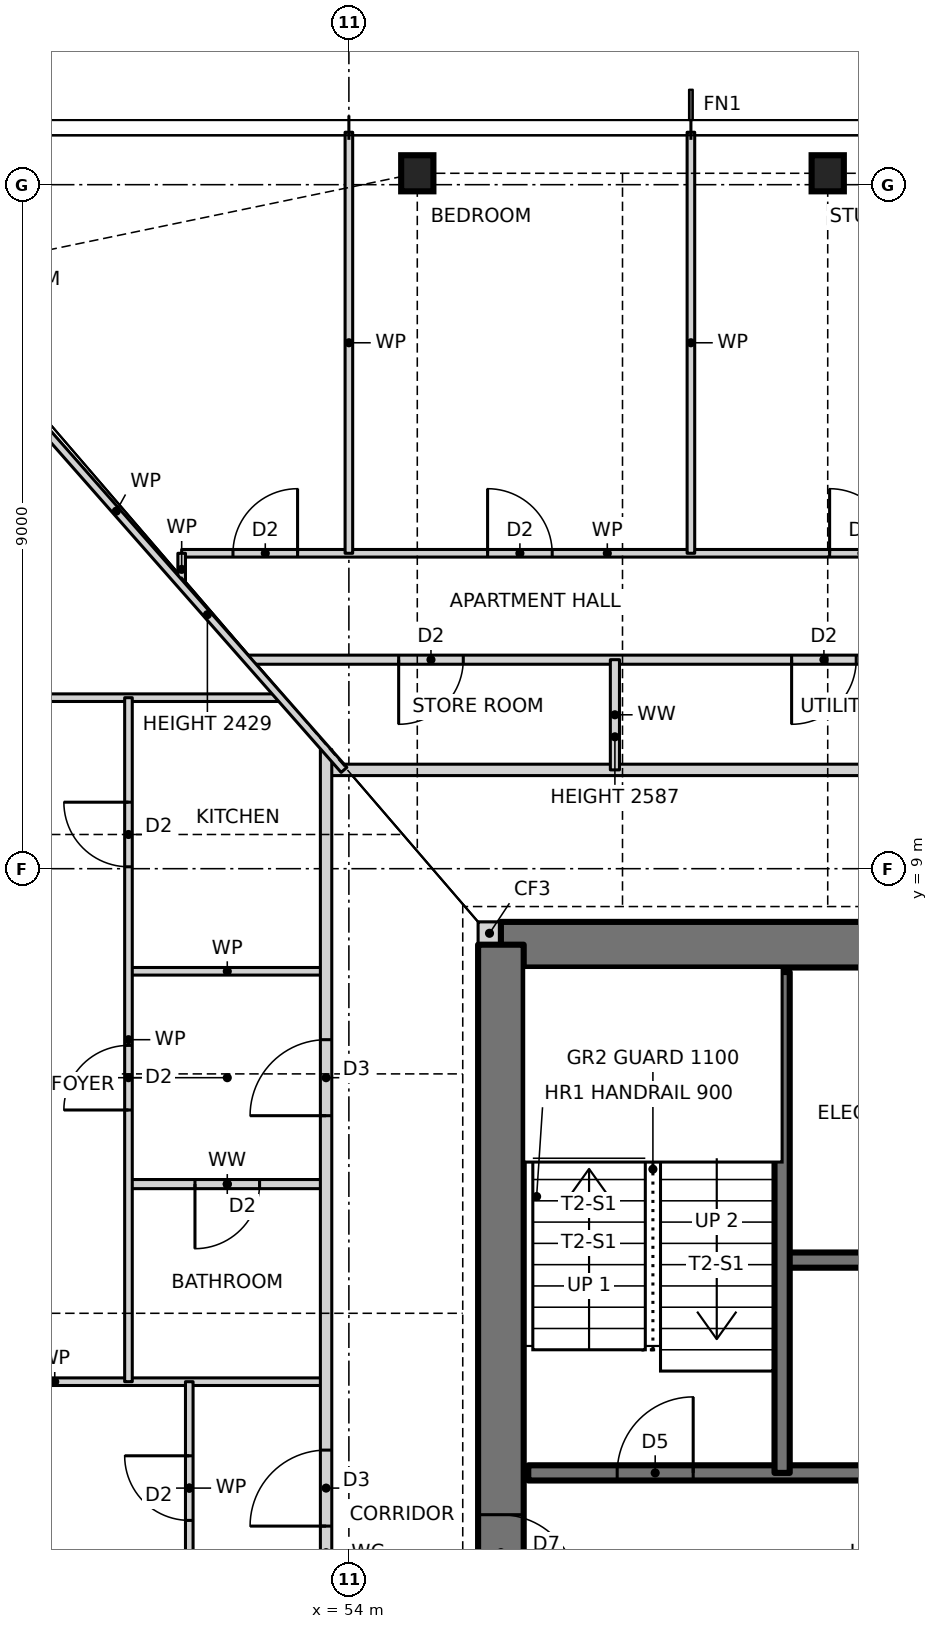
"""IFC4 building model, lengths in metres.
Left out: names, types, materials, properties, quantities, classifications, styles, units other than length and angle.
Written with IfcOpenShell. Run it as: python <this file> out.ifc"""

import sys

from ifc_helpers import new_model, si_unit, direction, frame, frame_2d, origin, origin_2d, place, context, subcontext, project, spatial, rectangle, i_section, extrude, element, fill, save


model = new_model("IFC4")
c1 = context("Model", 3, precision=1e-05, world=origin(), true_north=direction((0.0, 1.0)))
c2 = subcontext(c1, "Body", "Model", "MODEL_VIEW")
j1 = project(units=[si_unit("LENGTHUNIT", "METRE"), si_unit("PLANEANGLEUNIT", "RADIAN")], contexts=[c1])
p1 = place(None, origin())
s1 = spatial("IfcSite", under=j1, at=p1, CompositionType="ELEMENT")
p2 = place(p1, origin())
s2 = spatial("IfcBuilding", under=s1, at=p2, CompositionType="ELEMENT")
p3 = place(p2, frame((0.0, 0.0, 50.0)))
s3 = spatial("IfcBuildingStorey", under=s2, at=p3, CompositionType="ELEMENT", Elevation=50.0)
for number, where, z_axis, x_axis in (
    (1, (60.3, 18.15, 0.0), (0.0, 0.0, 1.0), (1.0, 0.0, 0.0)),
    (2, (54.9, 18.15, 0.0), (0.0, 0.0, 1.0), (1.0, 0.0, 0.0)),
):
    element("IfcColumn", number, at=place(p3, frame(where, z_axis=z_axis, x_axis=x_axis)), inside=s3, PredefinedType="COLUMN", context=c2, shape_type="SweptSolid", body=[
        extrude(i_section(OverallWidth=0.424, OverallDepth=0.475, WebThickness=0.048, FlangeThickness=0.077, at=origin_2d()), origin(), (0.0, 0.0, 1.0), 3.5),
    ])
p4 = place(p3, frame((55.7, 8.15, 0.0), z_axis=(0.0, 0.0, 1.0), x_axis=(1.0, 0.0, 0.0)))
e3 = element("IfcWall", 3, at=p4, inside=s3, PredefinedType="SOLIDWALL", context=c2, shape_type="SweptSolid", body=[
    extrude(rectangle(XDim=0.3, YDim=0.3, at=frame_2d((0.15, 0.0))), origin(), (0.0, 0.0, 1.0), 3.5),
])
p5 = place(p3, frame((70.0, 8.0, 0.0), z_axis=(0.0, 0.0, 1.0), x_axis=(-1.0, 0.0, 0.0)))
e4 = element("IfcWall", 4, at=p5, inside=s3, PredefinedType="SHEAR", context=c2, shape_type="SweptSolid", body=[
    extrude(rectangle(XDim=14.0, YDim=0.6, at=frame_2d((7.0, 0.0))), origin(), (0.0, 0.0, 1.0), 3.5),
])
p6 = place(p5, frame((8.2, 0.0, 0.0)))
e5 = element("IfcOpeningElement", 5, at=p6, cuts=e4, PredefinedType="OPENING", context=c2, shape_type="SweptSolid", body=[
    extrude(rectangle(XDim=0.9, YDim=2.1, at=frame_2d((0.45, 1.05))), frame((0.0, 0.31, 0.0), z_axis=(0.0, -1.0, 0.0), x_axis=(1.0, 0.0, 0.0)), (0.0, 0.0, 1.0), 0.62),
])
p7 = place(p5, frame((3.2, 0.0, 0.0)))
e6 = element("IfcOpeningElement", 6, at=p7, cuts=e4, PredefinedType="OPENING", context=c2, shape_type="SweptSolid", body=[
    extrude(rectangle(XDim=0.9, YDim=2.1, at=frame_2d((0.45, 1.05))), frame((0.0, 0.31, 0.0), z_axis=(0.0, -1.0, 0.0), x_axis=(1.0, 0.0, 0.0)), (0.0, 0.0, 1.0), 0.62),
])
p8 = place(p3, frame((56.0, 8.0, 0.0), z_axis=(0.0, 0.0, 1.0), x_axis=(0.0, -1.0, 0.0)))
e7 = element("IfcWall", 7, at=p8, inside=s3, PredefinedType="SHEAR", context=c2, shape_type="SweptSolid", body=[
    extrude(rectangle(XDim=16.0, YDim=0.6, at=frame_2d((8.0, 0.0))), origin(), (0.0, 0.0, 1.0), 3.5),
])
p9 = place(p8, frame((7.5, 0.0, 0.0)))
e8 = element("IfcOpeningElement", 8, at=p9, cuts=e7, PredefinedType="OPENING", context=c2, shape_type="SweptSolid", body=[
    extrude(rectangle(XDim=1.0, YDim=2.1, at=frame_2d((0.5, 1.05))), frame((0.0, 0.31, 0.0), z_axis=(0.0, -1.0, 0.0), x_axis=(1.0, 0.0, 0.0)), (0.0, 0.0, 1.0), 0.62),
])
p10 = place(p3, frame((56.36, 1.05, 0.0), z_axis=(0.0, 0.0, 1.0), x_axis=(1.0, 0.0, 0.0)))
e9 = element("IfcWall", 9, at=p10, inside=s3, PredefinedType="SOLIDWALL", context=c2, shape_type="SweptSolid", body=[
    extrude(rectangle(XDim=13.28, YDim=0.2, at=frame_2d((6.64, 0.0))), origin(), (0.0, 0.0, 1.0), 3.5),
])
p11 = place(p10, frame((1.17, 0.0, 0.0)))
e10 = element("IfcOpeningElement", 10, at=p11, cuts=e9, PredefinedType="OPENING", context=c2, shape_type="SweptSolid", body=[
    extrude(rectangle(XDim=1.0, YDim=2.1, at=frame_2d((0.5, 1.05))), frame((0.0, 0.11, 0.0), z_axis=(0.0, -1.0, 0.0), x_axis=(1.0, 0.0, 0.0)), (0.0, 0.0, 1.0), 0.22),
])
p12 = place(p10, frame((6.19, 0.0, 0.0)))
e11 = element("IfcOpeningElement", 11, at=p12, cuts=e9, PredefinedType="OPENING", context=c2, shape_type="SweptSolid", body=[
    extrude(rectangle(XDim=0.9, YDim=2.1, at=frame_2d((0.45, 1.05))), frame((0.0, 0.11, 0.0), z_axis=(0.0, -1.0, 0.0), x_axis=(1.0, 0.0, 0.0)), (0.0, 0.0, 1.0), 0.22),
])
p13 = place(p10, frame((10.96, 0.0, 0.0)))
e12 = element("IfcOpeningElement", 12, at=p13, cuts=e9, PredefinedType="OPENING", context=c2, shape_type="SweptSolid", body=[
    extrude(rectangle(XDim=1.3, YDim=2.1, at=frame_2d((0.65, 1.05))), frame((0.0, 0.11, 0.0), z_axis=(0.0, -1.0, 0.0), x_axis=(1.0, 0.0, 0.0)), (0.0, 0.0, 1.0), 0.22),
])
p14 = place(p3, frame((46.56, 2.25, 0.0), z_axis=(0.0, 0.0, 1.0), x_axis=(1.0, 0.0, 0.0)))
e13 = element("IfcWall", 13, at=p14, inside=s3, PredefinedType="PARTITIONING", context=c2, shape_type="SweptSolid", body=[
    extrude(rectangle(XDim=7.14, YDim=0.1, at=frame_2d((3.57, 0.0))), origin(), (0.0, 0.0, 1.0), 3.27),
])
p15 = place(p3, frame((59.7, 3.85, 0.0), z_axis=(0.0, 0.0, 1.0), x_axis=(1.0, 0.0, 0.0)))
e14 = element("IfcWall", 14, at=p15, inside=s3, PredefinedType="SOLIDWALL", context=c2, shape_type="SweptSolid", body=[
    extrude(rectangle(XDim=9.94, YDim=0.2, at=frame_2d((4.97, 0.0))), origin(), (0.0, 0.0, 1.0), 3.5),
])
p16 = place(p3, frame((51.1, 4.85, 0.0), z_axis=(0.0, 0.0, 1.0), x_axis=(1.0, 0.0, 0.0)))
e15 = element("IfcWall", 15, at=p16, inside=s3, PredefinedType="PARTITIONING", context=c2, shape_type="SweptSolid", body=[
    extrude(rectangle(XDim=2.6, YDim=0.12, at=frame_2d((1.3, 0.0))), origin(), (0.0, 0.0, 1.0), 3.27),
])
p17 = place(p16, frame((0.875, 0.0, 0.0)))
e16 = element("IfcOpeningElement", 16, at=p17, cuts=e15, PredefinedType="OPENING", context=c2, shape_type="SweptSolid", body=[
    extrude(rectangle(XDim=0.85, YDim=2.1, at=frame_2d((0.425, 1.05))), frame((0.0, 0.07, 0.0), z_axis=(0.0, -1.0, 0.0), x_axis=(1.0, 0.0, 0.0)), (0.0, 0.0, 1.0), 0.14),
])
p18 = place(p3, frame((51.1, 7.65, 0.0), z_axis=(0.0, 0.0, 1.0), x_axis=(1.0, 0.0, 0.0)))
e17 = element("IfcWall", 17, at=p18, inside=s3, PredefinedType="PARTITIONING", context=c2, shape_type="SweptSolid", body=[
    extrude(rectangle(XDim=2.6, YDim=0.1, at=frame_2d((1.3, 0.0))), origin(), (0.0, 0.0, 1.0), 3.27),
])
p19 = place(p3, frame((53.7, 10.3, 0.0), z_axis=(0.0, 0.0, 1.0), x_axis=(1.0, 0.0, 0.0)))
e18 = element("IfcWall", 18, at=p19, inside=s3, PredefinedType="PARTITIONING", context=c2, shape_type="SweptSolid", body=[
    extrude(rectangle(XDim=18.6, YDim=0.15, at=frame_2d((9.3, 0.0))), origin(), (0.0, 0.0, 1.0), 3.27),
])
p20 = place(p19, frame((12.8, 0.0, 0.0)))
e19 = element("IfcOpeningElement", 19, at=p20, cuts=e18, PredefinedType="OPENING", context=c2, shape_type="SweptSolid", body=[
    extrude(rectangle(XDim=1.0, YDim=2.1, at=frame_2d((0.5, 1.05))), frame((0.0, 0.085, 0.0), z_axis=(0.0, -1.0, 0.0), x_axis=(1.0, 0.0, 0.0)), (0.0, 0.0, 1.0), 0.17),
])
p21 = place(p3, frame((46.56, 11.25, 0.0), z_axis=(0.0, 0.0, 1.0), x_axis=(1.0, 0.0, 0.0)))
e20 = element("IfcWall", 20, at=p21, inside=s3, PredefinedType="PARTITIONING", context=c2, shape_type="SweptSolid", body=[
    extrude(rectangle(XDim=6.54, YDim=0.1, at=frame_2d((3.27, 0.0))), origin(), (0.0, 0.0, 1.0), 3.27),
])
p22 = place(p21, frame((1.845, 0.0, 0.0)))
e21 = element("IfcOpeningElement", 21, at=p22, cuts=e20, PredefinedType="OPENING", context=c2, shape_type="SweptSolid", body=[
    extrude(rectangle(XDim=0.85, YDim=2.1, at=frame_2d((0.425, 1.05))), frame((0.0, 0.06, 0.0), z_axis=(0.0, -1.0, 0.0), x_axis=(1.0, 0.0, 0.0)), (0.0, 0.0, 1.0), 0.12),
])
p23 = place(p3, frame((52.66, 11.75, 0.0), z_axis=(0.0, 0.0, 1.0), x_axis=(1.0, 0.0, 0.0)))
e22 = element("IfcWall", 22, at=p23, inside=s3, PredefinedType="PARTITIONING", context=c2, shape_type="SweptSolid", body=[
    extrude(rectangle(XDim=19.34, YDim=0.12, at=frame_2d((9.67, 0.0))), origin(), (0.0, 0.0, 1.0), 3.27),
])
p24 = place(p23, frame((17.115, 0.0, 0.0)))
e23 = element("IfcOpeningElement", 23, at=p24, cuts=e22, PredefinedType="OPENING", context=c2, shape_type="SweptSolid", body=[
    extrude(rectangle(XDim=0.85, YDim=2.1, at=frame_2d((0.425, 1.05))), frame((0.0, 0.07, 0.0), z_axis=(0.0, -1.0, 0.0), x_axis=(1.0, 0.0, 0.0)), (0.0, 0.0, 1.0), 0.14),
])
p25 = place(p23, frame((13.915, 0.0, 0.0)))
e24 = element("IfcOpeningElement", 24, at=p25, cuts=e22, PredefinedType="OPENING", context=c2, shape_type="SweptSolid", body=[
    extrude(rectangle(XDim=0.85, YDim=2.1, at=frame_2d((0.425, 1.05))), frame((0.0, 0.07, 0.0), z_axis=(0.0, -1.0, 0.0), x_axis=(1.0, 0.0, 0.0)), (0.0, 0.0, 1.0), 0.14),
])
p26 = place(p23, frame((7.165, 0.0, 0.0)))
e25 = element("IfcOpeningElement", 25, at=p26, cuts=e22, PredefinedType="OPENING", context=c2, shape_type="SweptSolid", body=[
    extrude(rectangle(XDim=0.85, YDim=2.1, at=frame_2d((0.425, 1.05))), frame((0.0, 0.07, 0.0), z_axis=(0.0, -1.0, 0.0), x_axis=(1.0, 0.0, 0.0)), (0.0, 0.0, 1.0), 0.14),
])
p27 = place(p23, frame((1.995, 0.0, 0.0)))
e26 = element("IfcOpeningElement", 26, at=p27, cuts=e22, PredefinedType="OPENING", context=c2, shape_type="SweptSolid", body=[
    extrude(rectangle(XDim=0.85, YDim=2.1, at=frame_2d((0.425, 1.05))), frame((0.0, 0.07, 0.0), z_axis=(0.0, -1.0, 0.0), x_axis=(1.0, 0.0, 0.0)), (0.0, 0.0, 1.0), 0.14),
])
p28 = place(p3, frame((51.8, 13.15, 0.0), z_axis=(0.0, 0.0, 1.0), x_axis=(1.0, 0.0, 0.0)))
e27 = element("IfcWall", 27, at=p28, inside=s3, PredefinedType="PARTITIONING", context=c2, shape_type="SweptSolid", body=[
    extrude(rectangle(XDim=11.2, YDim=0.1, at=frame_2d((5.6, 0.0))), origin(), (0.0, 0.0, 1.0), 3.27),
])
p29 = place(p28, frame((8.525, 0.0, 0.0)))
e28 = element("IfcOpeningElement", 28, at=p29, cuts=e27, PredefinedType="OPENING", context=c2, shape_type="SweptSolid", body=[
    extrude(rectangle(XDim=0.85, YDim=2.1, at=frame_2d((0.425, 1.05))), frame((0.0, 0.06, 0.0), z_axis=(0.0, -1.0, 0.0), x_axis=(1.0, 0.0, 0.0)), (0.0, 0.0, 1.0), 0.12),
])
p30 = place(p28, frame((4.025, 0.0, 0.0)))
e29 = element("IfcOpeningElement", 29, at=p30, cuts=e27, PredefinedType="OPENING", context=c2, shape_type="SweptSolid", body=[
    extrude(rectangle(XDim=0.85, YDim=2.1, at=frame_2d((0.425, 1.05))), frame((0.0, 0.06, 0.0), z_axis=(0.0, -1.0, 0.0), x_axis=(1.0, 0.0, 0.0)), (0.0, 0.0, 1.0), 0.12),
])
p31 = place(p28, frame((0.675, 0.0, 0.0)))
e30 = element("IfcOpeningElement", 30, at=p31, cuts=e27, PredefinedType="OPENING", context=c2, shape_type="SweptSolid", body=[
    extrude(rectangle(XDim=0.85, YDim=2.1, at=frame_2d((0.425, 1.05))), frame((0.0, 0.06, 0.0), z_axis=(0.0, -1.0, 0.0), x_axis=(1.0, 0.0, 0.0)), (0.0, 0.0, 1.0), 0.12),
])
p32 = place(p3, frame((59.7, 1.05, 0.0), z_axis=(0.0, 0.0, 1.0), x_axis=(0.0, 1.0, 0.0)))
e31 = element("IfcWall", 31, at=p32, inside=s3, PredefinedType="SOLIDWALL", context=c2, shape_type="SweptSolid", body=[
    extrude(rectangle(XDim=6.59, YDim=0.2, at=frame_2d((3.295, 0.0))), origin(), (0.0, 0.0, 1.0), 3.5),
])
p33 = place(p3, frame((58.5, 13.15, 0.0), z_axis=(0.0, 0.0, 1.0), x_axis=(0.0, 1.0, 0.0)))
e32 = element("IfcWall", 32, at=p33, inside=s3, PredefinedType="PARTITIONING", context=c2, shape_type="SweptSolid", body=[
    extrude(rectangle(XDim=5.54, YDim=0.1, at=frame_2d((2.77, 0.0))), origin(), (0.0, 0.0, 1.0), 3.27),
])
p34 = place(p3, frame((57.5, 10.3, 0.0), z_axis=(0.0, 0.0, 1.0), x_axis=(0.0, 1.0, 0.0)))
e33 = element("IfcWall", 33, at=p34, inside=s3, PredefinedType="PARTITIONING", context=c2, shape_type="SweptSolid", body=[
    extrude(rectangle(XDim=1.45, YDim=0.12, at=frame_2d((0.725, 0.0))), origin(), (0.0, 0.0, 1.0), 2.587),
])
p35 = place(p3, frame((54.0, 13.15, 0.0), z_axis=(0.0, 0.0, 1.0), x_axis=(0.0, 1.0, 0.0)))
e34 = element("IfcWall", 34, at=p35, inside=s3, PredefinedType="PARTITIONING", context=c2, shape_type="SweptSolid", body=[
    extrude(rectangle(XDim=5.54, YDim=0.1, at=frame_2d((2.77, 0.0))), origin(), (0.0, 0.0, 1.0), 3.27),
])
p36 = place(p3, frame((53.7, -10.568, 0.0), z_axis=(0.0, 0.0, 1.0), x_axis=(0.0, 1.0, 0.0)))
e35 = element("IfcWall", 35, at=p36, inside=s3, PredefinedType="PARTITIONING", context=c2, shape_type="SweptSolid", body=[
    extrude(rectangle(XDim=21.136, YDim=0.15, at=frame_2d((10.568, 0.0))), origin(), (0.0, 0.0, 1.0), 3.27),
])
p37 = place(p36, frame((16.318, 0.0, 0.0)))
e36 = element("IfcOpeningElement", 36, at=p37, cuts=e35, PredefinedType="OPENING", context=c2, shape_type="SweptSolid", body=[
    extrude(rectangle(XDim=1.0, YDim=2.1, at=frame_2d((0.5, 1.05))), frame((0.0, 0.085, 0.0), z_axis=(0.0, -1.0, 0.0), x_axis=(1.0, 0.0, 0.0)), (0.0, 0.0, 1.0), 0.17),
])
p38 = place(p36, frame((10.918, 0.0, 0.0)))
e37 = element("IfcOpeningElement", 37, at=p38, cuts=e35, PredefinedType="OPENING", context=c2, shape_type="SweptSolid", body=[
    extrude(rectangle(XDim=1.0, YDim=2.1, at=frame_2d((0.5, 1.05))), frame((0.0, 0.085, 0.0), z_axis=(0.0, -1.0, 0.0), x_axis=(1.0, 0.0, 0.0)), (0.0, 0.0, 1.0), 0.17),
])
p39 = place(p3, frame((51.9, -0.55, 0.0), z_axis=(0.0, 0.0, 1.0), x_axis=(0.0, 1.0, 0.0)))
e38 = element("IfcWall", 38, at=p39, inside=s3, PredefinedType="PARTITIONING", context=c2, shape_type="SweptSolid", body=[
    extrude(rectangle(XDim=2.8, YDim=0.1, at=frame_2d((1.4, 0.0))), origin(), (0.0, 0.0, 1.0), 3.27),
])
p40 = place(p39, frame((0.975, 0.0, 0.0)))
e39 = element("IfcOpeningElement", 39, at=p40, cuts=e38, PredefinedType="OPENING", context=c2, shape_type="SweptSolid", body=[
    extrude(rectangle(XDim=0.85, YDim=2.1, at=frame_2d((0.425, 1.05))), frame((0.0, 0.06, 0.0), z_axis=(0.0, -1.0, 0.0), x_axis=(1.0, 0.0, 0.0)), (0.0, 0.0, 1.0), 0.12),
])
p41 = place(p3, frame((51.8, 12.727, 0.0), z_axis=(0.0, 0.0, 1.0), x_axis=(0.0, 1.0, 0.0)))
e40 = element("IfcWall", 40, at=p41, inside=s3, PredefinedType="PARTITIONING", context=c2, shape_type="SweptSolid", body=[
    extrude(rectangle(XDim=0.423, YDim=0.1, at=frame_2d((0.211, 0.0))), origin(), (0.0, 0.0, 1.0), 3.27),
])
p42 = place(p3, frame((51.1, 2.25, 0.0), z_axis=(0.0, 0.0, 1.0), x_axis=(0.0, 1.0, 0.0)))
e41 = element("IfcWall", 41, at=p42, inside=s3, PredefinedType="PARTITIONING", context=c2, shape_type="SweptSolid", body=[
    extrude(rectangle(XDim=9.0, YDim=0.1, at=frame_2d((4.5, 0.0))), origin(), (0.0, 0.0, 1.0), 3.27),
])
p43 = place(p42, frame((6.775, 0.0, 0.0)))
e42 = element("IfcOpeningElement", 42, at=p43, cuts=e41, PredefinedType="OPENING", context=c2, shape_type="SweptSolid", body=[
    extrude(rectangle(XDim=0.85, YDim=2.1, at=frame_2d((0.425, 1.05))), frame((0.0, 0.06, 0.0), z_axis=(0.0, -1.0, 0.0), x_axis=(1.0, 0.0, 0.0)), (0.0, 0.0, 1.0), 0.12),
])
p44 = place(p42, frame((3.575, 0.0, 0.0)))
e43 = element("IfcOpeningElement", 43, at=p44, cuts=e41, PredefinedType="OPENING", context=c2, shape_type="SweptSolid", body=[
    extrude(rectangle(XDim=0.85, YDim=2.1, at=frame_2d((0.425, 1.05))), frame((0.0, 0.06, 0.0), z_axis=(0.0, -1.0, 0.0), x_axis=(1.0, 0.0, 0.0)), (0.0, 0.0, 1.0), 0.12),
])
p45 = place(p3, frame((53.936, 10.3, 0.0), z_axis=(0.0, 0.0, 1.0), x_axis=(-0.660638210404, 0.750704439146, 0.0)))
e44 = element("IfcWall", 44, at=p45, inside=s3, PredefinedType="PARTITIONING", context=c2, shape_type="SweptSolid", body=[
    extrude(rectangle(XDim=9.07, YDim=0.1, at=frame_2d((4.535, 0.0))), origin(), (0.0, 0.0, 1.0), 2.429),
])
p46 = place(p11, origin())
e45 = element("IfcDoor", 45, at=p46, inside=s3, OperationType="SINGLE_SWING_RIGHT", PredefinedType="DOOR", context=c2, shape_type="SweptSolid", body=[
    extrude(rectangle(XDim=1.0, YDim=2.1, at=frame_2d((0.5, 1.05))), frame((0.0, 0.025, 0.0), z_axis=(0.0, -1.0, 0.0), x_axis=(1.0, 0.0, 0.0)), (0.0, 0.0, 1.0), 0.05),
])
fill(e10, e45)
p47 = place(p29, origin())
e46 = element("IfcDoor", 46, at=p47, inside=s3, OperationType="SINGLE_SWING_LEFT", PredefinedType="DOOR", context=c2, shape_type="SweptSolid", body=[
    extrude(rectangle(XDim=0.85, YDim=2.1, at=frame_2d((0.425, 1.05))), frame((0.0, 0.025, 0.0), z_axis=(0.0, -1.0, 0.0), x_axis=(1.0, 0.0, 0.0)), (0.0, 0.0, 1.0), 0.05),
])
fill(e28, e46)
p48 = place(p30, origin())
e47 = element("IfcDoor", 47, at=p48, inside=s3, OperationType="SINGLE_SWING_LEFT", PredefinedType="DOOR", context=c2, shape_type="SweptSolid", body=[
    extrude(rectangle(XDim=0.85, YDim=2.1, at=frame_2d((0.425, 1.05))), frame((0.0, 0.025, 0.0), z_axis=(0.0, -1.0, 0.0), x_axis=(1.0, 0.0, 0.0)), (0.0, 0.0, 1.0), 0.05),
])
fill(e29, e47)
p49 = place(p31, origin())
e48 = element("IfcDoor", 48, at=p49, inside=s3, OperationType="SINGLE_SWING_RIGHT", PredefinedType="DOOR", context=c2, shape_type="SweptSolid", body=[
    extrude(rectangle(XDim=0.85, YDim=2.1, at=frame_2d((0.425, 1.05))), frame((0.0, 0.025, 0.0), z_axis=(0.0, -1.0, 0.0), x_axis=(1.0, 0.0, 0.0)), (0.0, 0.0, 1.0), 0.05),
])
fill(e30, e48)
p50 = place(p26, frame((0.85, 0.0, 0.0), z_axis=(0.0, 0.0, 1.0), x_axis=(-1.0, 0.0, 0.0)))
e49 = element("IfcDoor", 49, at=p50, inside=s3, OperationType="SINGLE_SWING_RIGHT", PredefinedType="DOOR", context=c2, shape_type="SweptSolid", body=[
    extrude(rectangle(XDim=0.85, YDim=2.1, at=frame_2d((0.425, 1.05))), frame((0.0, 0.025, 0.0), z_axis=(0.0, -1.0, 0.0), x_axis=(1.0, 0.0, 0.0)), (0.0, 0.0, 1.0), 0.05),
])
fill(e25, e49)
p51 = place(p27, frame((0.85, 0.0, 0.0), z_axis=(0.0, 0.0, 1.0), x_axis=(-1.0, 0.0, 0.0)))
e50 = element("IfcDoor", 50, at=p51, inside=s3, OperationType="SINGLE_SWING_RIGHT", PredefinedType="DOOR", context=c2, shape_type="SweptSolid", body=[
    extrude(rectangle(XDim=0.85, YDim=2.1, at=frame_2d((0.425, 1.05))), frame((0.0, 0.025, 0.0), z_axis=(0.0, -1.0, 0.0), x_axis=(1.0, 0.0, 0.0)), (0.0, 0.0, 1.0), 0.05),
])
fill(e26, e50)
p52 = place(p43, origin())
e51 = element("IfcDoor", 51, at=p52, inside=s3, OperationType="SINGLE_SWING_RIGHT", PredefinedType="DOOR", context=c2, shape_type="SweptSolid", body=[
    extrude(rectangle(XDim=0.85, YDim=2.1, at=frame_2d((0.425, 1.05))), frame((0.0, 0.025, 0.0), z_axis=(0.0, -1.0, 0.0), x_axis=(1.0, 0.0, 0.0)), (0.0, 0.0, 1.0), 0.05),
])
fill(e42, e51)
p53 = place(p37, origin())
e52 = element("IfcDoor", 52, at=p53, inside=s3, OperationType="SINGLE_SWING_LEFT", PredefinedType="DOOR", context=c2, shape_type="SweptSolid", body=[
    extrude(rectangle(XDim=1.0, YDim=2.1, at=frame_2d((0.5, 1.05))), frame((0.0, 0.025, 0.0), z_axis=(0.0, -1.0, 0.0), x_axis=(1.0, 0.0, 0.0)), (0.0, 0.0, 1.0), 0.05),
])
fill(e36, e52)
p54 = place(p44, origin())
e53 = element("IfcDoor", 53, at=p54, inside=s3, OperationType="SINGLE_SWING_LEFT", PredefinedType="DOOR", context=c2, shape_type="SweptSolid", body=[
    extrude(rectangle(XDim=0.85, YDim=2.1, at=frame_2d((0.425, 1.05))), frame((0.0, 0.025, 0.0), z_axis=(0.0, -1.0, 0.0), x_axis=(1.0, 0.0, 0.0)), (0.0, 0.0, 1.0), 0.05),
])
fill(e43, e53)
p55 = place(p17, frame((0.85, 0.0, 0.0), z_axis=(0.0, 0.0, 1.0), x_axis=(-1.0, 0.0, 0.0)))
e54 = element("IfcDoor", 54, at=p55, inside=s3, OperationType="SINGLE_SWING_RIGHT", PredefinedType="DOOR", context=c2, shape_type="SweptSolid", body=[
    extrude(rectangle(XDim=0.85, YDim=2.1, at=frame_2d((0.425, 1.05))), frame((0.0, 0.025, 0.0), z_axis=(0.0, -1.0, 0.0), x_axis=(1.0, 0.0, 0.0)), (0.0, 0.0, 1.0), 0.05),
])
fill(e16, e54)
p56 = place(p38, origin())
e55 = element("IfcDoor", 55, at=p56, inside=s3, OperationType="SINGLE_SWING_LEFT", PredefinedType="DOOR", context=c2, shape_type="SweptSolid", body=[
    extrude(rectangle(XDim=1.0, YDim=2.1, at=frame_2d((0.5, 1.05))), frame((0.0, 0.025, 0.0), z_axis=(0.0, -1.0, 0.0), x_axis=(1.0, 0.0, 0.0)), (0.0, 0.0, 1.0), 0.05),
])
fill(e37, e55)
p57 = place(p40, origin())
e56 = element("IfcDoor", 56, at=p57, inside=s3, OperationType="SINGLE_SWING_RIGHT", PredefinedType="DOOR", context=c2, shape_type="SweptSolid", body=[
    extrude(rectangle(XDim=0.85, YDim=2.1, at=frame_2d((0.425, 1.05))), frame((0.0, 0.025, 0.0), z_axis=(0.0, -1.0, 0.0), x_axis=(1.0, 0.0, 0.0)), (0.0, 0.0, 1.0), 0.05),
])
fill(e39, e56)
p58 = place(p9, origin())
e57 = element("IfcDoor", 57, at=p58, inside=s3, OperationType="SINGLE_SWING_RIGHT", PredefinedType="DOOR", context=c2, shape_type="SweptSolid", body=[
    extrude(rectangle(XDim=1.0, YDim=2.1, at=frame_2d((0.5, 1.05))), frame((0.0, 0.025, 0.0), z_axis=(0.0, -1.0, 0.0), x_axis=(1.0, 0.0, 0.0)), (0.0, 0.0, 1.0), 0.05),
])
fill(e8, e57)
save(model, sys.argv[1])
